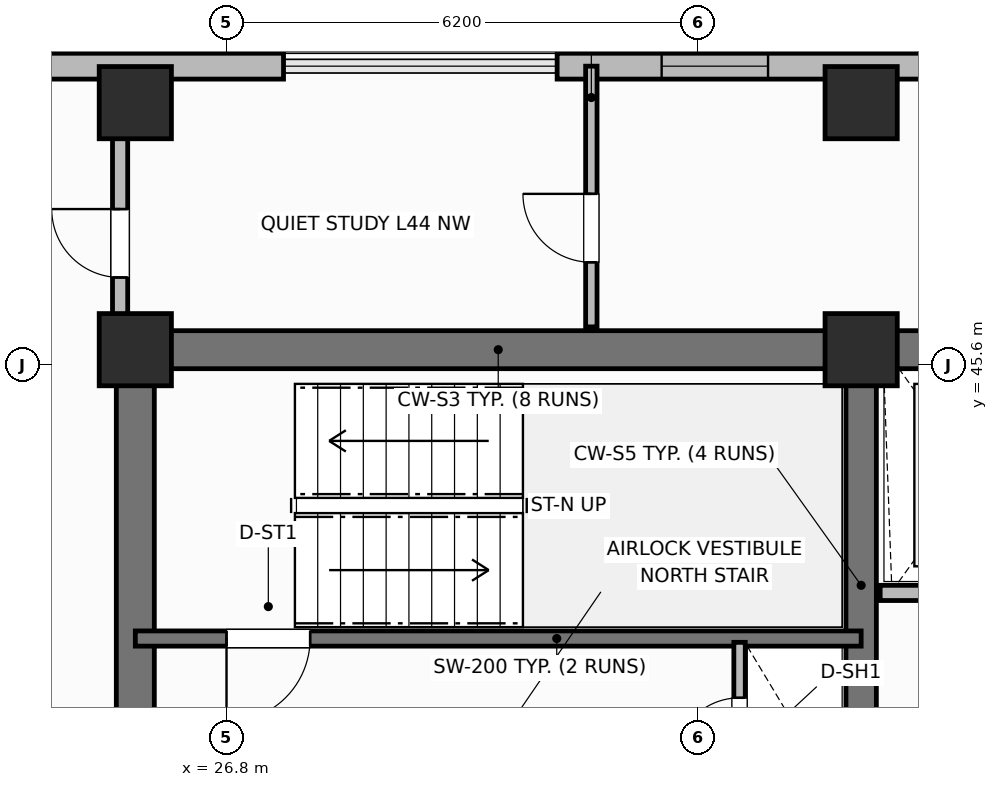
"""IFC4 building model, lengths in metres.
Left out: names, types, materials, properties, quantities, classifications, styles, units other than length and angle.
Written with IfcOpenShell. Run it as: python <this file> out.ifc"""

import sys

from ifc_helpers import new_model, si_unit, direction, frame, frame_2d, origin, origin_2d, place, context, subcontext, project, spatial, rectangle, extrude, element, fill, save


model = new_model("IFC4")
c1 = context("Model", 3, precision=1e-05, world=origin(), true_north=direction((0.0, 1.0)))
c2 = subcontext(c1, "Body", "Model", "MODEL_VIEW")
j1 = project(units=[si_unit("LENGTHUNIT", "METRE"), si_unit("PLANEANGLEUNIT", "RADIAN")], contexts=[c1])
p1 = place(None, origin())
s1 = spatial("IfcSite", under=j1, at=p1, CompositionType="ELEMENT")
p2 = place(p1, origin())
s2 = spatial("IfcBuilding", under=s1, at=p2, CompositionType="ELEMENT")
p3 = place(p2, frame((0.0, 0.0, 177.4)))
s3 = spatial("IfcBuildingStorey", under=s2, at=p3, CompositionType="ELEMENT", Elevation=177.4)
p4 = place(p3, frame((25.6, 45.8, 0.0), z_axis=(0.0, 0.0, 1.0), x_axis=(1.0, 0.0, 0.0)))
e1 = element("IfcWall", 1, at=p4, inside=s3, PredefinedType="SHEAR", context=c2, shape_type="SweptSolid", body=[
    extrude(rectangle(XDim=27.2, YDim=0.5, at=frame_2d((13.6, 0.0))), origin(), (0.0, 0.0, 1.0), 3.7),
])
p5 = place(p3, frame((25.6, 39.85, 0.0), z_axis=(0.0, 0.0, 1.0), x_axis=(0.0, 1.0, 0.0)))
e2 = element("IfcWall", 2, at=p5, inside=s3, PredefinedType="SHEAR", context=c2, shape_type="SweptSolid", body=[
    extrude(rectangle(XDim=5.7, YDim=0.5, at=frame_2d((2.85, 0.0))), origin(), (0.0, 0.0, 1.0), 3.7),
])
p6 = place(p3, frame((35.15, 39.85, 0.0), z_axis=(0.0, 0.0, 1.0), x_axis=(0.0, 1.0, 0.0)))
e3 = element("IfcWall", 3, at=p6, inside=s3, PredefinedType="SHEAR", context=c2, shape_type="SweptSolid", body=[
    extrude(rectangle(XDim=5.7, YDim=0.4, at=frame_2d((2.85, 0.0))), origin(), (0.0, 0.0, 1.0), 3.7),
])
for number, where, z_axis, x_axis in (
    (4, (25.6, 45.8, 0.0), (0.0, 0.0, 1.0), (1.0, 0.0, 0.0)),
    (5, (35.15, 45.8, 0.0), (0.0, 0.0, 1.0), (1.0, 0.0, 0.0)),
    (6, (25.6, 49.05, 0.0), (0.0, 0.0, 1.0), (1.0, 0.0, 0.0)),
    (7, (35.15, 49.05, 0.0), (0.0, 0.0, 1.0), (1.0, 0.0, 0.0)),
):
    element("IfcColumn", number, at=place(p3, frame(where, z_axis=z_axis, x_axis=x_axis)), inside=s3, PredefinedType="COLUMN", context=c2, shape_type="SweptSolid", body=[
        extrude(rectangle(XDim=0.95, YDim=0.95, at=origin_2d()), origin(), (0.0, 0.0, 1.0), 3.7),
    ])
p7 = place(p3, frame((36.0, 49.53, 0.0), z_axis=(0.0, 0.0, 1.0), x_axis=(-1.0, 0.0, 0.0)))
e8 = element("IfcWall", 8, at=p7, inside=s3, PredefinedType="SOLIDWALL", context=c2, shape_type="SweptSolid", body=[
    extrude(rectangle(XDim=4.85, YDim=0.34, at=frame_2d((2.425, 0.0))), origin(), (0.0, 0.0, 1.0), 2.72),
])
p8 = place(p7, frame((2.075, 0.0, 0.75)))
e9 = element("IfcOpeningElement", 9, at=p8, cuts=e8, PredefinedType="OPENING", context=c2, shape_type="SweptSolid", body=[
    extrude(rectangle(XDim=1.4, YDim=1.85, at=frame_2d((0.7, 0.925))), frame((0.0, 0.18, 0.0), z_axis=(0.0, -1.0, 0.0), x_axis=(1.0, 0.0, 0.0)), (0.0, 0.0, 1.0), 0.36),
])
p9 = place(p3, frame((27.55, 49.53, 0.0), z_axis=(0.0, 0.0, 1.0), x_axis=(-1.0, 0.0, 0.0)))
e10 = element("IfcWall", 10, at=p9, inside=s3, PredefinedType="SOLIDWALL", context=c2, shape_type="SweptSolid", body=[
    extrude(rectangle(XDim=7.35, YDim=0.34, at=frame_2d((3.675, 0.0))), origin(), (0.0, 0.0, 1.0), 2.72),
])
p10 = place(p3, frame((35.15, 42.0, 0.0), z_axis=(0.0, 0.0, 1.0), x_axis=(-1.0, 0.0, 0.0)))
e11 = element("IfcWall", 11, at=p10, inside=s3, PredefinedType="SHEAR", context=c2, shape_type="SweptSolid", body=[
    extrude(rectangle(XDim=9.55, YDim=0.2, at=frame_2d((4.775, 0.0))), origin(), (0.0, 0.0, 1.0), 3.7),
])
p11 = place(p10, frame((7.25, 0.0, 0.0)))
e12 = element("IfcOpeningElement", 12, at=p11, cuts=e11, PredefinedType="OPENING", context=c2, shape_type="SweptSolid", body=[
    extrude(rectangle(XDim=1.1, YDim=2.15, at=frame_2d((0.55, 1.075))), frame((0.0, 0.11, 0.0), z_axis=(0.0, -1.0, 0.0), x_axis=(1.0, 0.0, 0.0)), (0.0, 0.0, 1.0), 0.22),
])
p12 = place(p3, frame((33.55, 39.82, 0.0), z_axis=(0.0, 0.0, 1.0), x_axis=(0.0, 1.0, 0.0)))
e13 = element("IfcWall", 13, at=p12, inside=s3, PredefinedType="PARTITIONING", context=c2, shape_type="SweptSolid", body=[
    extrude(rectangle(XDim=2.13, YDim=0.15, at=frame_2d((1.065, 0.0))), origin(), (0.0, 0.0, 1.0), 2.55),
])
p13 = place(p12, frame((0.55, 0.0, 0.0)))
e14 = element("IfcOpeningElement", 14, at=p13, cuts=e13, PredefinedType="OPENING", context=c2, shape_type="SweptSolid", body=[
    extrude(rectangle(XDim=0.85, YDim=2.05, at=frame_2d((0.425, 1.025))), frame((0.0, 0.085, 0.0), z_axis=(0.0, -1.0, 0.0), x_axis=(1.0, 0.0, 0.0)), (0.0, 0.0, 1.0), 0.17),
])
p14 = place(p3, frame((37.95, 42.6, 0.0), z_axis=(0.0, 0.0, 1.0), x_axis=(-1.0, 0.0, 0.0)))
e15 = element("IfcWall", 15, at=p14, inside=s3, PredefinedType="PARTITIONING", context=c2, shape_type="SweptSolid", body=[
    extrude(rectangle(XDim=2.55, YDim=0.2, at=frame_2d((1.275, 0.0))), origin(), (0.0, 0.0, 1.0), 2.32),
])
p15 = place(p14, frame((0.75, 0.0, 0.0)))
e16 = element("IfcOpeningElement", 16, at=p15, cuts=e15, PredefinedType="OPENING", context=c2, shape_type="SweptSolid", body=[
    extrude(rectangle(XDim=1.1, YDim=2.15, at=frame_2d((0.55, 1.075))), frame((0.0, 0.11, 0.0), z_axis=(0.0, -1.0, 0.0), x_axis=(1.0, 0.0, 0.0)), (0.0, 0.0, 1.0), 0.22),
])
p16 = place(p3, frame((31.6, 46.1, 0.0), z_axis=(0.0, 0.0, 1.0), x_axis=(0.0, 1.0, 0.0)))
e17 = element("IfcWall", 17, at=p16, inside=s3, PredefinedType="PARTITIONING", context=c2, shape_type="SweptSolid", body=[
    extrude(rectangle(XDim=3.43, YDim=0.15, at=frame_2d((1.715, 0.0))), origin(), (0.0, 0.0, 1.0), 2.55),
])
p17 = place(p16, frame((0.85, 0.0, 0.0)))
e18 = element("IfcOpeningElement", 18, at=p17, cuts=e17, PredefinedType="OPENING", context=c2, shape_type="SweptSolid", body=[
    extrude(rectangle(XDim=0.9, YDim=2.1, at=frame_2d((0.45, 1.05))), frame((0.0, 0.085, 0.0), z_axis=(0.0, -1.0, 0.0), x_axis=(1.0, 0.0, 0.0)), (0.0, 0.0, 1.0), 0.17),
])
p18 = place(p3, frame((25.4, 46.1, 0.0), z_axis=(0.0, 0.0, 1.0), x_axis=(0.0, 1.0, 0.0)))
e19 = element("IfcWall", 19, at=p18, inside=s3, PredefinedType="PARTITIONING", context=c2, shape_type="SweptSolid", body=[
    extrude(rectangle(XDim=2.68, YDim=0.2, at=frame_2d((1.34, 0.0))), origin(), (0.0, 0.0, 1.0), 2.55),
])
p19 = place(p18, frame((0.65, 0.0, 0.0)))
e20 = element("IfcOpeningElement", 20, at=p19, cuts=e19, PredefinedType="OPENING", context=c2, shape_type="SweptSolid", body=[
    extrude(rectangle(XDim=0.9, YDim=2.1, at=frame_2d((0.45, 1.05))), frame((0.0, 0.11, 0.0), z_axis=(0.0, -1.0, 0.0), x_axis=(1.0, 0.0, 0.0)), (0.0, 0.0, 1.0), 0.22),
])
p20 = place(p8, origin())
e21 = element("IfcWindow", 21, at=p20, inside=s3, PartitioningType="SINGLE_PANEL", PredefinedType="WINDOW", context=c2, shape_type="SweptSolid", body=[
    extrude(rectangle(XDim=1.4, YDim=1.85, at=frame_2d((0.7, 0.925))), frame((0.0, 0.03, 0.0), z_axis=(0.0, -1.0, 0.0), x_axis=(1.0, 0.0, 0.0)), (0.0, 0.0, 1.0), 0.06),
])
fill(e9, e21)
p21 = place(p11, origin())
e22 = element("IfcDoor", 22, at=p21, inside=s3, OperationType="SINGLE_SWING_RIGHT", PredefinedType="DOOR", context=c2, shape_type="SweptSolid", body=[
    extrude(rectangle(XDim=1.1, YDim=2.15, at=frame_2d((0.55, 1.075))), frame((0.0, 0.025, 0.0), z_axis=(0.0, -1.0, 0.0), x_axis=(1.0, 0.0, 0.0)), (0.0, 0.0, 1.0), 0.05),
])
fill(e12, e22)
p22 = place(p13, origin())
e23 = element("IfcDoor", 23, at=p22, inside=s3, OperationType="SINGLE_SWING_LEFT", PredefinedType="TRAPDOOR", context=c2, shape_type="SweptSolid", body=[
    extrude(rectangle(XDim=0.85, YDim=2.05, at=frame_2d((0.425, 1.025))), frame((0.0, 0.025, 0.0), z_axis=(0.0, -1.0, 0.0), x_axis=(1.0, 0.0, 0.0)), (0.0, 0.0, 1.0), 0.05),
])
fill(e14, e23)
p23 = place(p17, origin())
e24 = element("IfcDoor", 24, at=p23, inside=s3, OperationType="SINGLE_SWING_RIGHT", PredefinedType="DOOR", context=c2, shape_type="SweptSolid", body=[
    extrude(rectangle(XDim=0.9, YDim=2.1, at=frame_2d((0.45, 1.05))), frame((0.0, 0.025, 0.0), z_axis=(0.0, -1.0, 0.0), x_axis=(1.0, 0.0, 0.0)), (0.0, 0.0, 1.0), 0.05),
])
fill(e18, e24)
p24 = place(p19, origin())
e25 = element("IfcDoor", 25, at=p24, inside=s3, OperationType="SINGLE_SWING_RIGHT", PredefinedType="DOOR", context=c2, shape_type="SweptSolid", body=[
    extrude(rectangle(XDim=0.9, YDim=2.1, at=frame_2d((0.45, 1.05))), frame((0.0, 0.025, 0.0), z_axis=(0.0, -1.0, 0.0), x_axis=(1.0, 0.0, 0.0)), (0.0, 0.0, 1.0), 0.05),
])
fill(e20, e25)
save(model, sys.argv[1])
